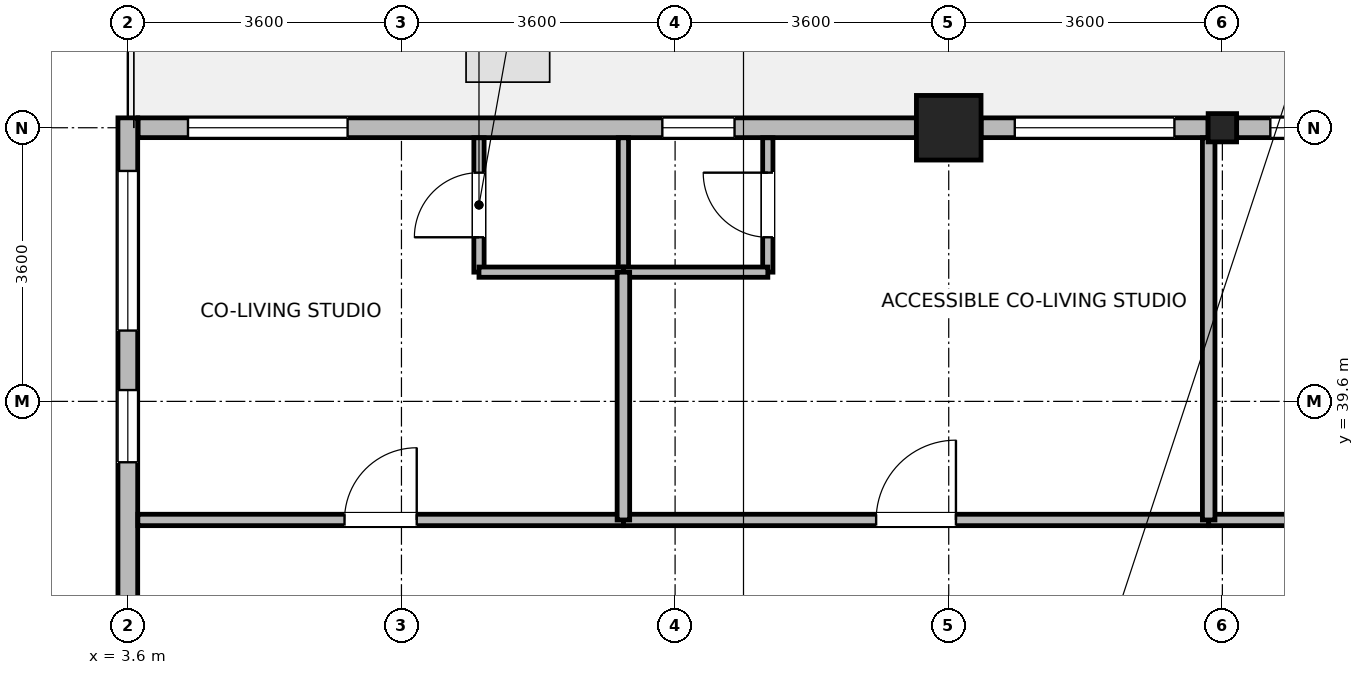
"""IFC4 building model, lengths in metres.
Left out: names, types, materials, properties, quantities, classifications, styles, units other than length and angle.
Written with IfcOpenShell. Run it as: python <this file> out.ifc"""

import sys

from ifc_helpers import new_model, si_unit, direction, frame, frame_2d, origin, origin_2d, place, context, subcontext, project, spatial, rectangle, i_section, extrude, source, transform, mapped, element, fill, save


model = new_model("IFC4")
c1 = context("Model", 3, precision=1e-05, world=origin(), true_north=direction((0.0, 1.0)))
c2 = subcontext(c1, "Body", "Model", "MODEL_VIEW")
j1 = project(units=[si_unit("LENGTHUNIT", "METRE"), si_unit("PLANEANGLEUNIT", "RADIAN")], contexts=[c1])
p1 = place(None, origin())
s1 = spatial("IfcSite", under=j1, at=p1, CompositionType="ELEMENT")
p2 = place(p1, origin())
s2 = spatial("IfcBuilding", under=s1, at=p2, CompositionType="ELEMENT")
p3 = place(p2, frame((0.0, 0.0, 264.7)))
s3 = spatial("IfcBuildingStorey", under=s2, at=p3, CompositionType="ELEMENT", Elevation=264.7)
m1 = source(origin(), c2, "Body", "SweptSolid", [
    extrude(rectangle(XDim=0.85, YDim=0.85, at=origin_2d()), origin(), (0.0, 0.0, 1.0), 3.7),
])
p4 = place(p3, frame((14.4, 43.2, 0.0), z_axis=(0.0, 0.0, 1.0), x_axis=(1.0, 0.0, 0.0)))
e1 = element("IfcColumn", 1, at=p4, inside=s3, PredefinedType="COLUMN", context=c2, shape_type="MappedRepresentation", body=[
    mapped(m1, transform((0.0, 0.0, 0.0), x_axis=(1.0, 0.0, 0.0), y_axis=(0.0, 1.0, 0.0), z_axis=(0.0, 0.0, 1.0), scale=1.0)),
])
m2 = source(origin(), c2, "Body", "SweptSolid", [
    extrude(i_section(OverallWidth=0.374, OverallDepth=0.372, WebThickness=0.015, FlangeThickness=0.026, FilletRadius=0.015, at=origin_2d()), origin(), (0.0, 0.0, 1.0), 3.7),
])
p5 = place(p3, frame((18.0, 43.2, 0.0), z_axis=(0.0, 0.0, 1.0), x_axis=(1.0, 0.0, 0.0)))
e2 = element("IfcColumn", 2, at=p5, inside=s3, PredefinedType="COLUMN", context=c2, shape_type="MappedRepresentation", body=[
    mapped(m2, transform((0.0, 0.0, 0.0), x_axis=(1.0, 0.0, 0.0), y_axis=(0.0, 1.0, 0.0), z_axis=(0.0, 0.0, 1.0), scale=1.0)),
])
p6 = place(p3, frame((18.188, 43.2, 0.0), z_axis=(0.0, 0.0, 1.0), x_axis=(1.0, 0.0, 0.0)))
e3 = element("IfcWall", 3, at=p6, inside=s3, PredefinedType="STANDARD", context=c2, shape_type="SweptSolid", body=[
    extrude(rectangle(XDim=2.986, YDim=0.26, at=frame_2d((1.493, 0.0))), origin(), (0.0, 0.0, 1.0), 3.055),
])
p7 = place(p6, frame((0.443, 0.0, 0.85)))
e4 = element("IfcOpeningElement", 4, at=p7, cuts=e3, PredefinedType="OPENING", context=c2, shape_type="SweptSolid", body=[
    extrude(rectangle(XDim=2.1, YDim=1.95, at=frame_2d((1.05, 0.975))), frame((0.0, 0.14, 0.0), z_axis=(0.0, -1.0, 0.0), x_axis=(1.0, 0.0, 0.0)), (0.0, 0.0, 1.0), 0.28),
])
p8 = place(p3, frame((14.826, 43.2, 0.0), z_axis=(0.0, 0.0, 1.0), x_axis=(1.0, 0.0, 0.0)))
e5 = element("IfcWall", 5, at=p8, inside=s3, PredefinedType="STANDARD", context=c2, shape_type="SweptSolid", body=[
    extrude(rectangle(XDim=2.986, YDim=0.26, at=frame_2d((1.493, 0.0))), origin(), (0.0, 0.0, 1.0), 3.055),
])
p9 = place(p8, frame((0.443, 0.0, 0.85)))
e6 = element("IfcOpeningElement", 6, at=p9, cuts=e5, PredefinedType="OPENING", context=c2, shape_type="SweptSolid", body=[
    extrude(rectangle(XDim=2.1, YDim=1.95, at=frame_2d((1.05, 0.975))), frame((0.0, 0.14, 0.0), z_axis=(0.0, -1.0, 0.0), x_axis=(1.0, 0.0, 0.0)), (0.0, 0.0, 1.0), 0.28),
])
p10 = place(p3, frame((3.735, 43.2, 0.0), z_axis=(0.0, 0.0, 1.0), x_axis=(1.0, 0.0, 0.0)))
e7 = element("IfcWall", 7, at=p10, inside=s3, PredefinedType="STANDARD", context=c2, shape_type="SweptSolid", body=[
    extrude(rectangle(XDim=10.239, YDim=0.26, at=frame_2d((5.12, 0.0))), origin(), (0.0, 0.0, 1.0), 3.455),
])
p11 = place(p10, frame((0.656, 0.0, 0.85)))
e8 = element("IfcOpeningElement", 8, at=p11, cuts=e7, PredefinedType="OPENING", context=c2, shape_type="SweptSolid", body=[
    extrude(rectangle(XDim=2.1, YDim=1.95, at=frame_2d((1.05, 0.975))), frame((0.0, 0.14, 0.0), z_axis=(0.0, -1.0, 0.0), x_axis=(1.0, 0.0, 0.0)), (0.0, 0.0, 1.0), 0.28),
])
p12 = place(p10, frame((6.897, 0.0, 0.85)))
e9 = element("IfcOpeningElement", 9, at=p12, cuts=e7, PredefinedType="OPENING", context=c2, shape_type="SweptSolid", body=[
    extrude(rectangle(XDim=0.95, YDim=1.75, at=frame_2d((0.475, 0.875))), frame((0.0, 0.14, 0.0), z_axis=(0.0, -1.0, 0.0), x_axis=(1.0, 0.0, 0.0)), (0.0, 0.0, 1.0), 0.28),
])
p13 = place(p3, frame((3.6, 36.337, 0.0), z_axis=(0.0, 0.0, 1.0), x_axis=(0.0, 1.0, 0.0)))
e10 = element("IfcWall", 10, at=p13, inside=s3, PredefinedType="STANDARD", context=c2, shape_type="SweptSolid", body=[
    extrude(rectangle(XDim=6.993, YDim=0.26, at=frame_2d((3.497, 0.0))), origin(), (0.0, 0.0, 1.0), 3.455),
])
p14 = place(p13, frame((4.195, 0.0, 0.85)))
e11 = element("IfcOpeningElement", 11, at=p14, cuts=e10, PredefinedType="OPENING", context=c2, shape_type="SweptSolid", body=[
    extrude(rectangle(XDim=2.1, YDim=1.95, at=frame_2d((1.05, 0.975))), frame((0.0, 0.14, 0.0), z_axis=(0.0, -1.0, 0.0), x_axis=(1.0, 0.0, 0.0)), (0.0, 0.0, 1.0), 0.28),
])
p15 = place(p13, frame((2.462, 0.0, 0.85)))
e12 = element("IfcOpeningElement", 12, at=p15, cuts=e10, PredefinedType="OPENING", context=c2, shape_type="SweptSolid", body=[
    extrude(rectangle(XDim=0.95, YDim=1.75, at=frame_2d((0.475, 0.875))), frame((0.0, 0.14, 0.0), z_axis=(0.0, -1.0, 0.0), x_axis=(1.0, 0.0, 0.0)), (0.0, 0.0, 1.0), 0.28),
])
p16 = place(p3, frame((8.22, 41.3, 0.0), z_axis=(0.0, 0.0, 1.0), x_axis=(0.0, 1.0, 0.0)))
e13 = element("IfcWall", 13, at=p16, inside=s3, PredefinedType="PARTITIONING", context=c2, shape_type="SweptSolid", body=[
    extrude(rectangle(XDim=1.768, YDim=0.135, at=frame_2d((0.884, 0.0))), origin(), (0.0, 0.0, 1.0), 3.455),
])
p17 = place(p16, frame((0.459, 0.0, 0.0)))
e14 = element("IfcOpeningElement", 14, at=p17, cuts=e13, PredefinedType="OPENING", context=c2, shape_type="SweptSolid", body=[
    extrude(rectangle(XDim=0.85, YDim=2.04, at=frame_2d((0.425, 1.02))), frame((0.0, 0.078, 0.0), z_axis=(0.0, -1.0, 0.0), x_axis=(1.0, 0.0, 0.0)), (0.0, 0.0, 1.0), 0.155),
])
p18 = place(p3, frame((10.12, 41.3, 0.0), z_axis=(0.0, 0.0, 1.0), x_axis=(0.0, 1.0, 0.0)))
e15 = element("IfcWall", 15, at=p18, inside=s3, PredefinedType="PARTITIONING", context=c2, shape_type="SweptSolid", body=[
    extrude(rectangle(XDim=1.768, YDim=0.135, at=frame_2d((0.884, 0.0))), origin(), (0.0, 0.0, 1.0), 3.455),
])
p19 = place(p3, frame((12.02, 41.3, 0.0), z_axis=(0.0, 0.0, 1.0), x_axis=(0.0, 1.0, 0.0)))
e16 = element("IfcWall", 16, at=p19, inside=s3, PredefinedType="PARTITIONING", context=c2, shape_type="SweptSolid", body=[
    extrude(rectangle(XDim=1.768, YDim=0.135, at=frame_2d((0.884, 0.0))), origin(), (0.0, 0.0, 1.0), 3.455),
])
p20 = place(p19, frame((0.459, 0.0, 0.0)))
e17 = element("IfcOpeningElement", 17, at=p20, cuts=e16, PredefinedType="OPENING", context=c2, shape_type="SweptSolid", body=[
    extrude(rectangle(XDim=0.85, YDim=2.04, at=frame_2d((0.425, 1.02))), frame((0.0, 0.078, 0.0), z_axis=(0.0, -1.0, 0.0), x_axis=(1.0, 0.0, 0.0)), (0.0, 0.0, 1.0), 0.155),
])
p21 = place(p3, frame((10.12, 41.3, 0.0), z_axis=(0.0, 0.0, 1.0), x_axis=(1.0, 0.0, 0.0)))
e18 = element("IfcWall", 18, at=p21, inside=s3, PredefinedType="PARTITIONING", context=c2, shape_type="SweptSolid", body=[
    extrude(rectangle(XDim=1.9, YDim=0.135, at=frame_2d((0.95, 0.0))), origin(), (0.0, 0.0, 1.0), 3.455),
])
p22 = place(p3, frame((8.22, 41.3, 0.0), z_axis=(0.0, 0.0, 1.0), x_axis=(1.0, 0.0, 0.0)))
e19 = element("IfcWall", 19, at=p22, inside=s3, PredefinedType="PARTITIONING", context=c2, shape_type="SweptSolid", body=[
    extrude(rectangle(XDim=1.9, YDim=0.135, at=frame_2d((0.95, 0.0))), origin(), (0.0, 0.0, 1.0), 3.455),
])
p23 = place(p3, frame((10.12, 38.04, 0.0), z_axis=(0.0, 0.0, 1.0), x_axis=(1.0, 0.0, 0.0)))
e20 = element("IfcWall", 20, at=p23, inside=s3, PredefinedType="PARTITIONING", context=c2, shape_type="SweptSolid", body=[
    extrude(rectangle(XDim=7.7, YDim=0.15, at=frame_2d((3.85, 0.0))), origin(), (0.0, 0.0, 1.0), 3.455),
])
p24 = place(p23, frame((3.325, 0.0, 0.0)))
e21 = element("IfcOpeningElement", 21, at=p24, cuts=e20, PredefinedType="OPENING", context=c2, shape_type="SweptSolid", body=[
    extrude(rectangle(XDim=1.05, YDim=2.12, at=frame_2d((0.525, 1.06))), frame((0.0, 0.085, 0.0), z_axis=(0.0, -1.0, 0.0), x_axis=(1.0, 0.0, 0.0)), (0.0, 0.0, 1.0), 0.17),
])
p25 = place(p3, frame((17.82, 38.04, 0.0), z_axis=(0.0, 0.0, 1.0), x_axis=(1.0, 0.0, 0.0)))
e22 = element("IfcWall", 22, at=p25, inside=s3, PredefinedType="PARTITIONING", context=c2, shape_type="SweptSolid", body=[
    extrude(rectangle(XDim=7.14, YDim=0.15, at=frame_2d((3.57, 0.0))), origin(), (0.0, 0.0, 1.0), 3.455),
])
p26 = place(p25, frame((2.92, 0.0, 0.0)))
e23 = element("IfcOpeningElement", 23, at=p26, cuts=e22, PredefinedType="OPENING", context=c2, shape_type="SweptSolid", body=[
    extrude(rectangle(XDim=1.3, YDim=2.12, at=frame_2d((0.65, 1.06))), frame((0.0, 0.085, 0.0), z_axis=(0.0, -1.0, 0.0), x_axis=(1.0, 0.0, 0.0)), (0.0, 0.0, 1.0), 0.17),
])
p27 = place(p3, frame((3.732, 38.04, 0.0), z_axis=(0.0, 0.0, 1.0), x_axis=(1.0, 0.0, 0.0)))
e24 = element("IfcWall", 24, at=p27, inside=s3, PredefinedType="PARTITIONING", context=c2, shape_type="SweptSolid", body=[
    extrude(rectangle(XDim=6.388, YDim=0.15, at=frame_2d((3.194, 0.0))), origin(), (0.0, 0.0, 1.0), 3.455),
])
p28 = place(p27, frame((2.719, 0.0, 0.0)))
e25 = element("IfcOpeningElement", 25, at=p28, cuts=e24, PredefinedType="OPENING", context=c2, shape_type="SweptSolid", body=[
    extrude(rectangle(XDim=0.95, YDim=2.1, at=frame_2d((0.475, 1.05))), frame((0.0, 0.085, 0.0), z_axis=(0.0, -1.0, 0.0), x_axis=(1.0, 0.0, 0.0)), (0.0, 0.0, 1.0), 0.17),
])
p29 = place(p3, frame((17.82, 38.04, 0.0), z_axis=(0.0, 0.0, 1.0), x_axis=(0.0, 1.0, 0.0)))
e26 = element("IfcWall", 26, at=p29, inside=s3, PredefinedType="PARTITIONING", context=c2, shape_type="SweptSolid", body=[
    extrude(rectangle(XDim=5.028, YDim=0.165, at=frame_2d((2.514, 0.0))), origin(), (0.0, 0.0, 1.0), 3.185),
])
p30 = place(p3, frame((10.12, 38.04, 0.0), z_axis=(0.0, 0.0, 1.0), x_axis=(0.0, 1.0, 0.0)))
e27 = element("IfcWall", 27, at=p30, inside=s3, PredefinedType="PARTITIONING", context=c2, shape_type="SweptSolid", body=[
    extrude(rectangle(XDim=3.26, YDim=0.165, at=frame_2d((1.63, 0.0))), origin(), (0.0, 0.0, 1.0), 3.455),
])
p31 = place(p7, origin())
e28 = element("IfcWindow", 28, at=p31, inside=s3, PartitioningType="SINGLE_PANEL", PredefinedType="WINDOW", context=c2, shape_type="SweptSolid", body=[
    extrude(rectangle(XDim=2.1, YDim=1.95, at=frame_2d((1.05, 0.975))), frame((0.0, 0.03, 0.0), z_axis=(0.0, -1.0, 0.0), x_axis=(1.0, 0.0, 0.0)), (0.0, 0.0, 1.0), 0.06),
])
fill(e4, e28)
p32 = place(p9, origin())
e29 = element("IfcWindow", 29, at=p32, inside=s3, PartitioningType="SINGLE_PANEL", PredefinedType="WINDOW", context=c2, shape_type="SweptSolid", body=[
    extrude(rectangle(XDim=2.1, YDim=1.95, at=frame_2d((1.05, 0.975))), frame((0.0, 0.03, 0.0), z_axis=(0.0, -1.0, 0.0), x_axis=(1.0, 0.0, 0.0)), (0.0, 0.0, 1.0), 0.06),
])
fill(e6, e29)
p33 = place(p11, origin())
e30 = element("IfcWindow", 30, at=p33, inside=s3, PartitioningType="SINGLE_PANEL", PredefinedType="WINDOW", context=c2, shape_type="SweptSolid", body=[
    extrude(rectangle(XDim=2.1, YDim=1.95, at=frame_2d((1.05, 0.975))), frame((0.0, 0.03, 0.0), z_axis=(0.0, -1.0, 0.0), x_axis=(1.0, 0.0, 0.0)), (0.0, 0.0, 1.0), 0.06),
])
fill(e8, e30)
p34 = place(p12, origin())
e31 = element("IfcWindow", 31, at=p34, inside=s3, PartitioningType="SINGLE_PANEL", PredefinedType="WINDOW", context=c2, shape_type="SweptSolid", body=[
    extrude(rectangle(XDim=0.95, YDim=1.75, at=frame_2d((0.475, 0.875))), frame((0.0, 0.03, 0.0), z_axis=(0.0, -1.0, 0.0), x_axis=(1.0, 0.0, 0.0)), (0.0, 0.0, 1.0), 0.06),
])
fill(e9, e31)
p35 = place(p14, origin())
e32 = element("IfcWindow", 32, at=p35, inside=s3, PartitioningType="SINGLE_PANEL", PredefinedType="WINDOW", context=c2, shape_type="SweptSolid", body=[
    extrude(rectangle(XDim=2.1, YDim=1.95, at=frame_2d((1.05, 0.975))), frame((0.0, 0.03, 0.0), z_axis=(0.0, -1.0, 0.0), x_axis=(1.0, 0.0, 0.0)), (0.0, 0.0, 1.0), 0.06),
])
fill(e11, e32)
p36 = place(p15, origin())
e33 = element("IfcWindow", 33, at=p36, inside=s3, PartitioningType="SINGLE_PANEL", PredefinedType="WINDOW", context=c2, shape_type="SweptSolid", body=[
    extrude(rectangle(XDim=0.95, YDim=1.75, at=frame_2d((0.475, 0.875))), frame((0.0, 0.03, 0.0), z_axis=(0.0, -1.0, 0.0), x_axis=(1.0, 0.0, 0.0)), (0.0, 0.0, 1.0), 0.06),
])
fill(e12, e33)
p37 = place(p17, origin())
e34 = element("IfcDoor", 34, at=p37, inside=s3, OperationType="SINGLE_SWING_LEFT", PredefinedType="DOOR", context=c2, shape_type="SweptSolid", body=[
    extrude(rectangle(XDim=0.85, YDim=2.04, at=frame_2d((0.425, 1.02))), frame((0.0, 0.025, 0.0), z_axis=(0.0, -1.0, 0.0), x_axis=(1.0, 0.0, 0.0)), (0.0, 0.0, 1.0), 0.05),
])
fill(e14, e34)
p38 = place(p20, origin())
e35 = element("IfcDoor", 35, at=p38, inside=s3, OperationType="SINGLE_SWING_RIGHT", PredefinedType="DOOR", context=c2, shape_type="SweptSolid", body=[
    extrude(rectangle(XDim=0.85, YDim=2.04, at=frame_2d((0.425, 1.02))), frame((0.0, 0.025, 0.0), z_axis=(0.0, -1.0, 0.0), x_axis=(1.0, 0.0, 0.0)), (0.0, 0.0, 1.0), 0.05),
])
fill(e17, e35)
p39 = place(p24, origin())
e36 = element("IfcDoor", 36, at=p39, inside=s3, OperationType="SINGLE_SWING_RIGHT", PredefinedType="DOOR", context=c2, shape_type="SweptSolid", body=[
    extrude(rectangle(XDim=1.05, YDim=2.12, at=frame_2d((0.525, 1.06))), frame((0.0, 0.025, 0.0), z_axis=(0.0, -1.0, 0.0), x_axis=(1.0, 0.0, 0.0)), (0.0, 0.0, 1.0), 0.05),
])
fill(e21, e36)
p40 = place(p28, origin())
e37 = element("IfcDoor", 37, at=p40, inside=s3, OperationType="SINGLE_SWING_RIGHT", PredefinedType="DOOR", context=c2, shape_type="SweptSolid", body=[
    extrude(rectangle(XDim=0.95, YDim=2.1, at=frame_2d((0.475, 1.05))), frame((0.0, 0.025, 0.0), z_axis=(0.0, -1.0, 0.0), x_axis=(1.0, 0.0, 0.0)), (0.0, 0.0, 1.0), 0.05),
])
fill(e25, e37)
save(model, sys.argv[1])
